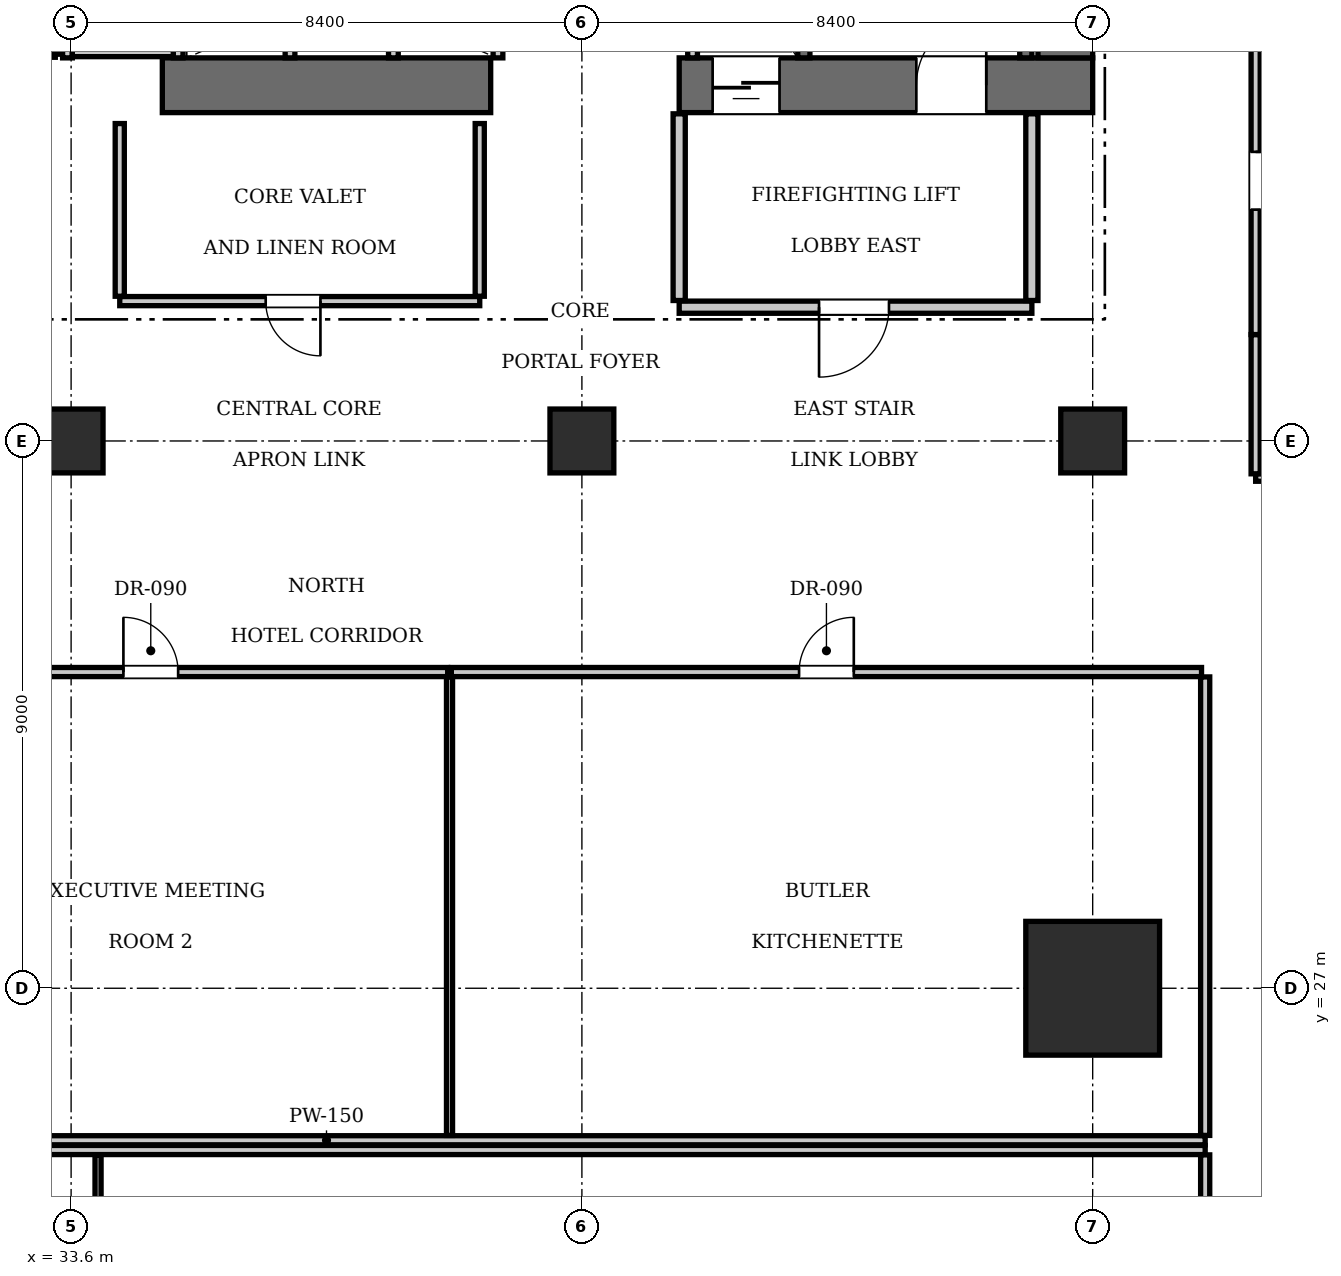
"""IFC4 building model, lengths in metres.
Left out: names, types, materials, properties, quantities, classifications, styles, units other than length and angle.
Written with IfcOpenShell. Run it as: python <this file> out.ifc"""

import sys

from ifc_helpers import new_model, si_unit, direction, frame, frame_2d, origin, origin_2d, place, context, subcontext, project, spatial, rectangle, extrude, element, fill, save


model = new_model("IFC4")
c1 = context("Model", 3, precision=1e-05, world=origin(), true_north=direction((0.0, 1.0)))
c2 = subcontext(c1, "Body", "Model", "MODEL_VIEW")
j1 = project(units=[si_unit("LENGTHUNIT", "METRE"), si_unit("PLANEANGLEUNIT", "RADIAN")], contexts=[c1])
p1 = place(None, origin())
s1 = spatial("IfcSite", under=j1, at=p1, CompositionType="ELEMENT")
p2 = place(p1, origin())
s2 = spatial("IfcBuilding", under=s1, at=p2, CompositionType="ELEMENT")
p3 = place(p2, frame((0.0, 0.0, 42.35)))
s3 = spatial("IfcBuildingStorey", under=s2, at=p3, CompositionType="ELEMENT", Elevation=42.35)
p4 = place(p3, frame((50.4, 27.0, 0.0), z_axis=(0.0, 0.0, 1.0), x_axis=(1.0, 0.0, 0.0)))
e1 = element("IfcColumn", 1, at=p4, inside=s3, PredefinedType="COLUMN", context=c2, shape_type="SweptSolid", body=[
    extrude(rectangle(XDim=2.2, YDim=2.2, at=origin_2d()), origin(), (0.0, 0.0, 1.0), 3.85),
])
p5 = place(p3, frame((35.1, 41.85, 0.0), z_axis=(0.0, 0.0, 1.0), x_axis=(1.0, 0.0, 0.0)))
e2 = element("IfcWall", 2, at=p5, inside=s3, PredefinedType="SHEAR", context=c2, shape_type="SweptSolid", body=[
    extrude(rectangle(XDim=5.4, YDim=0.9, at=frame_2d((2.7, 0.0))), origin(), (0.0, 0.0, 1.0), 3.85),
])
p6 = place(p3, frame((43.6, 41.85, 0.0), z_axis=(0.0, 0.0, 1.0), x_axis=(1.0, 0.0, 0.0)))
e3 = element("IfcWall", 3, at=p6, inside=s3, PredefinedType="SHEAR", context=c2, shape_type="SweptSolid", body=[
    extrude(rectangle(XDim=6.8, YDim=0.9, at=frame_2d((3.4, 0.0))), origin(), (0.0, 0.0, 1.0), 3.85),
])
p7 = place(p6, frame((3.9, 0.0, 0.0)))
e4 = element("IfcOpeningElement", 4, at=p7, cuts=e3, PredefinedType="OPENING", context=c2, shape_type="SweptSolid", body=[
    extrude(rectangle(XDim=1.15, YDim=2.15, at=frame_2d((0.575, 1.075))), frame((0.0, 0.46, 0.0), z_axis=(0.0, -1.0, 0.0), x_axis=(1.0, 0.0, 0.0)), (0.0, 0.0, 1.0), 0.92),
])
p8 = place(p6, frame((0.55, 0.0, 0.0)))
e5 = element("IfcOpeningElement", 5, at=p8, cuts=e3, PredefinedType="OPENING", context=c2, shape_type="SweptSolid", body=[
    extrude(rectangle(XDim=1.1, YDim=2.2, at=frame_2d((0.55, 1.1))), frame((0.0, 0.46, 0.0), z_axis=(0.0, -1.0, 0.0), x_axis=(1.0, 0.0, 0.0)), (0.0, 0.0, 1.0), 0.92),
])
p9 = place(p3, frame((49.95, 42.3, 0.0), z_axis=(0.0, 0.0, 1.0), x_axis=(0.0, 1.0, 0.0)))
e6 = element("IfcWall", 6, at=p9, inside=s3, PredefinedType="SHEAR", context=c2, shape_type="SweptSolid", body=[
    extrude(rectangle(XDim=1.6, YDim=0.9, at=frame_2d((0.8, 0.0))), origin(), (0.0, 0.0, 1.0), 3.85),
])
for number, where, z_axis, x_axis in (
    (7, (33.6, 36.0, 0.0), (0.0, 0.0, 1.0), (1.0, 0.0, 0.0)),
    (8, (42.0, 36.0, 0.0), (0.0, 0.0, 1.0), (1.0, 0.0, 0.0)),
    (9, (50.4, 36.0, 0.0), (0.0, 0.0, 1.0), (1.0, 0.0, 0.0)),
):
    element("IfcColumn", number, at=place(p3, frame(where, z_axis=z_axis, x_axis=x_axis)), inside=s3, PredefinedType="COLUMN", context=c2, shape_type="SweptSolid", body=[
        extrude(rectangle(XDim=1.05, YDim=1.05, at=origin_2d()), origin(), (0.0, 0.0, 1.0), 3.85),
    ])
p10 = place(p3, frame((45.65, 42.3, 0.0), z_axis=(0.0, 0.0, 1.0), x_axis=(0.0, 1.0, 0.0)))
e10 = element("IfcWall", 10, at=p10, inside=s3, PredefinedType="SOLIDWALL", context=c2, shape_type="SweptSolid", body=[
    extrude(rectangle(XDim=8.85, YDim=0.2, at=frame_2d((4.425, 0.0))), origin(), (0.0, 0.0, 1.0), 3.61),
])
p11 = place(p3, frame((49.3, 42.3, 0.0), z_axis=(0.0, 0.0, 1.0), x_axis=(0.0, 1.0, 0.0)))
e11 = element("IfcWall", 11, at=p11, inside=s3, PredefinedType="SOLIDWALL", context=c2, shape_type="SweptSolid", body=[
    extrude(rectangle(XDim=1.58, YDim=0.2, at=frame_2d((0.79, 0.0))), origin(), (0.0, 0.0, 1.0), 3.61),
])
p12 = place(p3, frame((43.82, 42.3, 0.0), z_axis=(0.0, 0.0, 1.0), x_axis=(0.0, 1.0, 0.0)))
e12 = element("IfcWall", 12, at=p12, inside=s3, PredefinedType="SOLIDWALL", context=c2, shape_type="SweptSolid", body=[
    extrude(rectangle(XDim=2.44, YDim=0.16, at=frame_2d((1.22, 0.0))), origin(), (0.0, 0.0, 1.0), 3.61),
])
for number, where, z_axis, x_axis in (
    (13, (37.2, 42.3, 0.0), (0.0, 0.0, 1.0), (0.0, 1.0, 0.0)),
    (14, (38.9, 42.3, 0.0), (0.0, 0.0, 1.0), (0.0, 1.0, 0.0)),
    (15, (40.62, 42.3, 0.0), (0.0, 0.0, 1.0), (0.0, 1.0, 0.0)),
):
    element("IfcWall", number, at=place(p3, frame(where, z_axis=z_axis, x_axis=x_axis)), inside=s3, PredefinedType="SOLIDWALL", context=c2, shape_type="SweptSolid", body=[
        extrude(rectangle(XDim=2.05, YDim=0.16, at=frame_2d((1.025, 0.0))), origin(), (0.0, 0.0, 1.0), 3.61),
    ])
for number, where, z_axis, x_axis in (
    (16, (33.54, 42.3, 0.0), (0.0, 0.0, 1.0), (0.0, 1.0, 0.0)),
    (17, (35.36, 42.3, 0.0), (0.0, 0.0, 1.0), (0.0, 1.0, 0.0)),
):
    element("IfcWall", number, at=place(p3, frame(where, z_axis=z_axis, x_axis=x_axis)), inside=s3, PredefinedType="SOLIDWALL", context=c2, shape_type="SweptSolid", body=[
        extrude(rectangle(XDim=2.1, YDim=0.16, at=frame_2d((1.05, 0.0))), origin(), (0.0, 0.0, 1.0), 3.61),
    ])
p13 = place(p3, frame((33.62, 42.4, 0.0), z_axis=(0.0, 0.0, 1.0), x_axis=(1.0, 0.0, 0.0)))
e18 = element("IfcWall", 18, at=p13, inside=s3, PredefinedType="SOLIDWALL", context=c2, shape_type="SweptSolid", body=[
    extrude(rectangle(XDim=1.66, YDim=0.16, at=frame_2d((0.83, 0.0))), origin(), (0.0, 0.0, 1.0), 3.61),
])
p14 = place(p3, frame((43.6, 38.2, 0.0), z_axis=(0.0, 0.0, 1.0), x_axis=(1.0, 0.0, 0.0)))
e19 = element("IfcWall", 19, at=p14, inside=s3, PredefinedType="PARTITIONING", context=c2, shape_type="SweptSolid", body=[
    extrude(rectangle(XDim=5.8, YDim=0.2, at=frame_2d((2.9, 0.0))), origin(), (0.0, 0.0, 1.0), 3.61),
])
p15 = place(p14, frame((2.3, 0.0, 0.0)))
e20 = element("IfcOpeningElement", 20, at=p15, cuts=e19, PredefinedType="OPENING", context=c2, shape_type="SweptSolid", body=[
    extrude(rectangle(XDim=1.15, YDim=2.15, at=frame_2d((0.575, 1.075))), frame((0.0, 0.11, 0.0), z_axis=(0.0, -1.0, 0.0), x_axis=(1.0, 0.0, 0.0)), (0.0, 0.0, 1.0), 0.22),
])
for number, where, z_axis, x_axis in (
    (21, (43.6, 38.31, 0.0), (0.0, 0.0, 1.0), (0.0, 1.0, 0.0)),
    (22, (49.4, 38.31, 0.0), (0.0, 0.0, 1.0), (0.0, 1.0, 0.0)),
):
    element("IfcWall", number, at=place(p3, frame(where, z_axis=z_axis, x_axis=x_axis)), inside=s3, PredefinedType="PARTITIONING", context=c2, shape_type="SweptSolid", body=[
        extrude(rectangle(XDim=3.07, YDim=0.2, at=frame_2d((1.535, 0.0))), origin(), (0.0, 0.0, 1.0), 3.61),
    ])
p16 = place(p3, frame((32.02, 42.36, 0.0), z_axis=(0.0, 0.0, 1.0), x_axis=(1.0, 0.0, 0.0)))
e23 = element("IfcWall", 23, at=p16, inside=s3, PredefinedType="PARTITIONING", context=c2, shape_type="SweptSolid", body=[
    extrude(rectangle(XDim=1.32, YDim=0.1, at=frame_2d((0.66, 0.0))), origin(), (0.0, 0.0, 1.0), 3.61),
])
p17 = place(p16, frame((0.24, 0.0, 0.0)))
e24 = element("IfcOpeningElement", 24, at=p17, cuts=e23, PredefinedType="OPENING", context=c2, shape_type="SweptSolid", body=[
    extrude(rectangle(XDim=0.8, YDim=2.05, at=frame_2d((0.4, 1.025))), frame((0.0, 0.06, 0.0), z_axis=(0.0, -1.0, 0.0), x_axis=(1.0, 0.0, 0.0)), (0.0, 0.0, 1.0), 0.12),
])
p18 = place(p3, frame((33.36, 42.36, 0.0), z_axis=(0.0, 0.0, 1.0), x_axis=(0.0, 1.0, 0.0)))
e25 = element("IfcWall", 25, at=p18, inside=s3, PredefinedType="PARTITIONING", context=c2, shape_type="SweptSolid", body=[
    extrude(rectangle(XDim=2.58, YDim=0.1, at=frame_2d((1.29, 0.0))), origin(), (0.0, 0.0, 1.0), 3.61),
])
p19 = place(p3, frame((34.4, 38.3, 0.0), z_axis=(0.0, 0.0, 1.0), x_axis=(1.0, 0.0, 0.0)))
e26 = element("IfcWall", 26, at=p19, inside=s3, PredefinedType="PARTITIONING", context=c2, shape_type="SweptSolid", body=[
    extrude(rectangle(XDim=5.92, YDim=0.15, at=frame_2d((2.96, 0.0))), origin(), (0.0, 0.0, 1.0), 3.61),
])
p20 = place(p19, frame((2.4, 0.0, 0.0)))
e27 = element("IfcOpeningElement", 27, at=p20, cuts=e26, PredefinedType="OPENING", context=c2, shape_type="SweptSolid", body=[
    extrude(rectangle(XDim=0.9, YDim=2.1, at=frame_2d((0.45, 1.05))), frame((0.0, 0.085, 0.0), z_axis=(0.0, -1.0, 0.0), x_axis=(1.0, 0.0, 0.0)), (0.0, 0.0, 1.0), 0.17),
])
for number, where, z_axis, x_axis in (
    (28, (34.4, 38.38, 0.0), (0.0, 0.0, 1.0), (0.0, 1.0, 0.0)),
    (29, (40.32, 38.38, 0.0), (0.0, 0.0, 1.0), (0.0, 1.0, 0.0)),
):
    element("IfcWall", number, at=place(p3, frame(where, z_axis=z_axis, x_axis=x_axis)), inside=s3, PredefinedType="PARTITIONING", context=c2, shape_type="SweptSolid", body=[
        extrude(rectangle(XDim=2.84, YDim=0.15, at=frame_2d((1.42, 0.0))), origin(), (0.0, 0.0, 1.0), 3.61),
    ])
p21 = place(p3, frame((23.35, 24.5, 0.0), z_axis=(0.0, 0.0, 1.0), x_axis=(1.0, 0.0, 0.0)))
e30 = element("IfcWall", 30, at=p21, inside=s3, PredefinedType="PARTITIONING", context=c2, shape_type="SweptSolid", body=[
    extrude(rectangle(XDim=28.9, YDim=0.15, at=frame_2d((14.45, 0.0))), origin(), (0.0, 0.0, 1.0), 3.61),
])
p22 = place(p3, frame((52.25, 24.58, 0.0), z_axis=(0.0, 0.0, 1.0), x_axis=(0.0, 1.0, 0.0)))
e31 = element("IfcWall", 31, at=p22, inside=s3, PredefinedType="PARTITIONING", context=c2, shape_type="SweptSolid", body=[
    extrude(rectangle(XDim=7.54, YDim=0.15, at=frame_2d((3.77, 0.0))), origin(), (0.0, 0.0, 1.0), 3.61),
])
p23 = place(p3, frame((30.027, 32.2, 0.0), z_axis=(0.0, 0.0, 1.0), x_axis=(1.0, 0.0, 0.0)))
e32 = element("IfcWall", 32, at=p23, inside=s3, PredefinedType="PARTITIONING", context=c2, shape_type="SweptSolid", body=[
    extrude(rectangle(XDim=9.766, YDim=0.15, at=frame_2d((4.883, 0.0))), origin(), (0.0, 0.0, 1.0), 3.61),
])
p24 = place(p23, frame((4.433, 0.0, 0.0)))
e33 = element("IfcOpeningElement", 33, at=p24, cuts=e32, PredefinedType="OPENING", context=c2, shape_type="SweptSolid", body=[
    extrude(rectangle(XDim=0.9, YDim=2.1, at=frame_2d((0.45, 1.05))), frame((0.0, 0.085, 0.0), z_axis=(0.0, -1.0, 0.0), x_axis=(1.0, 0.0, 0.0)), (0.0, 0.0, 1.0), 0.17),
])
p25 = place(p3, frame((39.823, 24.58, 0.0), z_axis=(0.0, 0.0, 1.0), x_axis=(0.0, 1.0, 0.0)))
e34 = element("IfcWall", 34, at=p25, inside=s3, PredefinedType="PARTITIONING", context=c2, shape_type="SweptSolid", body=[
    extrude(rectangle(XDim=7.54, YDim=0.1, at=frame_2d((3.77, 0.0))), origin(), (0.0, 0.0, 1.0), 3.61),
])
p26 = place(p3, frame((39.853, 32.2, 0.0), z_axis=(0.0, 0.0, 1.0), x_axis=(1.0, 0.0, 0.0)))
e35 = element("IfcWall", 35, at=p26, inside=s3, PredefinedType="PARTITIONING", context=c2, shape_type="SweptSolid", body=[
    extrude(rectangle(XDim=12.337, YDim=0.15, at=frame_2d((6.168, 0.0))), origin(), (0.0, 0.0, 1.0), 3.61),
])
p27 = place(p26, frame((5.719, 0.0, 0.0)))
e36 = element("IfcOpeningElement", 36, at=p27, cuts=e35, PredefinedType="OPENING", context=c2, shape_type="SweptSolid", body=[
    extrude(rectangle(XDim=0.9, YDim=2.1, at=frame_2d((0.45, 1.05))), frame((0.0, 0.085, 0.0), z_axis=(0.0, -1.0, 0.0), x_axis=(1.0, 0.0, 0.0)), (0.0, 0.0, 1.0), 0.17),
])
p28 = place(p3, frame((23.35, 24.34, 0.0), z_axis=(0.0, 0.0, 1.0), x_axis=(1.0, 0.0, 0.0)))
e37 = element("IfcWall", 37, at=p28, inside=s3, PredefinedType="PARTITIONING", context=c2, shape_type="SweptSolid", body=[
    extrude(rectangle(XDim=28.9, YDim=0.15, at=frame_2d((14.45, 0.0))), origin(), (0.0, 0.0, 1.0), 3.61),
])
p29 = place(p3, frame((52.25, 16.73, 0.0), z_axis=(0.0, 0.0, 1.0), x_axis=(0.0, 1.0, 0.0)))
e38 = element("IfcWall", 38, at=p29, inside=s3, PredefinedType="PARTITIONING", context=c2, shape_type="SweptSolid", body=[
    extrude(rectangle(XDim=7.53, YDim=0.15, at=frame_2d((3.765, 0.0))), origin(), (0.0, 0.0, 1.0), 3.61),
])
p30 = place(p3, frame((34.043, 16.73, 0.0), z_axis=(0.0, 0.0, 1.0), x_axis=(0.0, 1.0, 0.0)))
e39 = element("IfcWall", 39, at=p30, inside=s3, PredefinedType="PARTITIONING", context=c2, shape_type="SweptSolid", body=[
    extrude(rectangle(XDim=7.53, YDim=0.1, at=frame_2d((3.765, 0.0))), origin(), (0.0, 0.0, 1.0), 3.61),
])
p31 = place(p3, frame((53.08, 35.4, 0.0), z_axis=(0.0, 0.0, 1.0), x_axis=(1.0, 0.0, 0.0)))
e40 = element("IfcWall", 40, at=p31, inside=s3, PredefinedType="PARTITIONING", context=c2, shape_type="SweptSolid", body=[
    extrude(rectangle(XDim=11.62, YDim=0.125, at=frame_2d((5.81, 0.0))), origin(), (0.0, 0.0, 1.0), 3.61),
])
p32 = place(p3, frame((53.08, 35.46, 0.0), z_axis=(0.0, 0.0, 1.0), x_axis=(0.0, 1.0, 0.0)))
e41 = element("IfcWall", 41, at=p32, inside=s3, PredefinedType="PARTITIONING", context=c2, shape_type="SweptSolid", body=[
    extrude(rectangle(XDim=2.29, YDim=0.15, at=frame_2d((1.145, 0.0))), origin(), (0.0, 0.0, 1.0), 3.61),
])
p33 = place(p3, frame((53.08, 37.75, 0.0), z_axis=(0.0, 0.0, 1.0), x_axis=(0.0, 1.0, 0.0)))
e42 = element("IfcWall", 42, at=p33, inside=s3, PredefinedType="PARTITIONING", context=c2, shape_type="SweptSolid", body=[
    extrude(rectangle(XDim=5.059, YDim=0.15, at=frame_2d((2.529, 0.0))), origin(), (0.0, 0.0, 1.0), 3.61),
])
p34 = place(p33, frame((2.054, 0.0, 0.0)))
e43 = element("IfcOpeningElement", 43, at=p34, cuts=e42, PredefinedType="OPENING", context=c2, shape_type="SweptSolid", body=[
    extrude(rectangle(XDim=0.95, YDim=2.15, at=frame_2d((0.475, 1.075))), frame((0.0, 0.085, 0.0), z_axis=(0.0, -1.0, 0.0), x_axis=(1.0, 0.0, 0.0)), (0.0, 0.0, 1.0), 0.17),
])
p35 = place(p3, frame((53.18, 37.75, 0.0), z_axis=(0.0, 0.0, 1.0), x_axis=(1.0, 0.0, 0.0)))
e44 = element("IfcWall", 44, at=p35, inside=s3, PredefinedType="PARTITIONING", context=c2, shape_type="SweptSolid", body=[
    extrude(rectangle(XDim=2.3, YDim=0.1, at=frame_2d((1.15, 0.0))), origin(), (0.0, 0.0, 1.0), 3.61),
])
p36 = place(p35, frame((0.35, 0.0, 0.0)))
e45 = element("IfcOpeningElement", 45, at=p36, cuts=e44, PredefinedType="OPENING", context=c2, shape_type="SweptSolid", body=[
    extrude(rectangle(XDim=0.85, YDim=2.1, at=frame_2d((0.425, 1.05))), frame((0.0, 0.06, 0.0), z_axis=(0.0, -1.0, 0.0), x_axis=(1.0, 0.0, 0.0)), (0.0, 0.0, 1.0), 0.12),
])
p37 = place(p7, origin())
e46 = element("IfcDoor", 46, at=p37, inside=s3, OperationType="SINGLE_SWING_RIGHT", PredefinedType="DOOR", context=c2, shape_type="SweptSolid", body=[
    extrude(rectangle(XDim=1.15, YDim=2.15, at=frame_2d((0.575, 1.075))), frame((0.0, 0.025, 0.0), z_axis=(0.0, -1.0, 0.0), x_axis=(1.0, 0.0, 0.0)), (0.0, 0.0, 1.0), 0.05),
])
fill(e4, e46)
p38 = place(p8, frame((1.1, 0.0, 0.0), z_axis=(0.0, 0.0, 1.0), x_axis=(-1.0, 0.0, 0.0)))
e47 = element("IfcDoor", 47, at=p38, inside=s3, OperationType="SLIDING_TO_LEFT", PredefinedType="DOOR", context=c2, shape_type="SweptSolid", body=[
    extrude(rectangle(XDim=1.1, YDim=2.2, at=frame_2d((0.55, 1.1))), frame((0.0, 0.025, 0.0), z_axis=(0.0, -1.0, 0.0), x_axis=(1.0, 0.0, 0.0)), (0.0, 0.0, 1.0), 0.05),
])
fill(e5, e47)
p39 = place(p15, frame((1.15, 0.0, 0.0), z_axis=(0.0, 0.0, 1.0), x_axis=(-1.0, 0.0, 0.0)))
e48 = element("IfcDoor", 48, at=p39, inside=s3, OperationType="SINGLE_SWING_RIGHT", PredefinedType="DOOR", context=c2, shape_type="SweptSolid", body=[
    extrude(rectangle(XDim=1.15, YDim=2.15, at=frame_2d((0.575, 1.075))), frame((0.0, 0.025, 0.0), z_axis=(0.0, -1.0, 0.0), x_axis=(1.0, 0.0, 0.0)), (0.0, 0.0, 1.0), 0.05),
])
fill(e20, e48)
p40 = place(p20, frame((0.9, 0.0, 0.0), z_axis=(0.0, 0.0, 1.0), x_axis=(-1.0, 0.0, 0.0)))
e49 = element("IfcDoor", 49, at=p40, inside=s3, OperationType="SINGLE_SWING_LEFT", PredefinedType="DOOR", context=c2, shape_type="SweptSolid", body=[
    extrude(rectangle(XDim=0.9, YDim=2.1, at=frame_2d((0.45, 1.05))), frame((0.0, 0.025, 0.0), z_axis=(0.0, -1.0, 0.0), x_axis=(1.0, 0.0, 0.0)), (0.0, 0.0, 1.0), 0.05),
])
fill(e27, e49)
p41 = place(p24, origin())
e50 = element("IfcDoor", 50, at=p41, inside=s3, OperationType="SINGLE_SWING_LEFT", PredefinedType="DOOR", context=c2, shape_type="SweptSolid", body=[
    extrude(rectangle(XDim=0.9, YDim=2.1, at=frame_2d((0.45, 1.05))), frame((0.0, 0.025, 0.0), z_axis=(0.0, -1.0, 0.0), x_axis=(1.0, 0.0, 0.0)), (0.0, 0.0, 1.0), 0.05),
])
fill(e33, e50)
p42 = place(p27, origin())
e51 = element("IfcDoor", 51, at=p42, inside=s3, OperationType="SINGLE_SWING_RIGHT", PredefinedType="DOOR", context=c2, shape_type="SweptSolid", body=[
    extrude(rectangle(XDim=0.9, YDim=2.1, at=frame_2d((0.45, 1.05))), frame((0.0, 0.025, 0.0), z_axis=(0.0, -1.0, 0.0), x_axis=(1.0, 0.0, 0.0)), (0.0, 0.0, 1.0), 0.05),
])
fill(e36, e51)
p43 = place(p34, frame((0.95, 0.0, 0.0), z_axis=(0.0, 0.0, 1.0), x_axis=(-1.0, 0.0, 0.0)))
e52 = element("IfcDoor", 52, at=p43, inside=s3, OperationType="SINGLE_SWING_LEFT", PredefinedType="DOOR", context=c2, shape_type="SweptSolid", body=[
    extrude(rectangle(XDim=0.95, YDim=2.15, at=frame_2d((0.475, 1.075))), frame((0.0, 0.025, 0.0), z_axis=(0.0, -1.0, 0.0), x_axis=(1.0, 0.0, 0.0)), (0.0, 0.0, 1.0), 0.05),
])
fill(e43, e52)
save(model, sys.argv[1])
